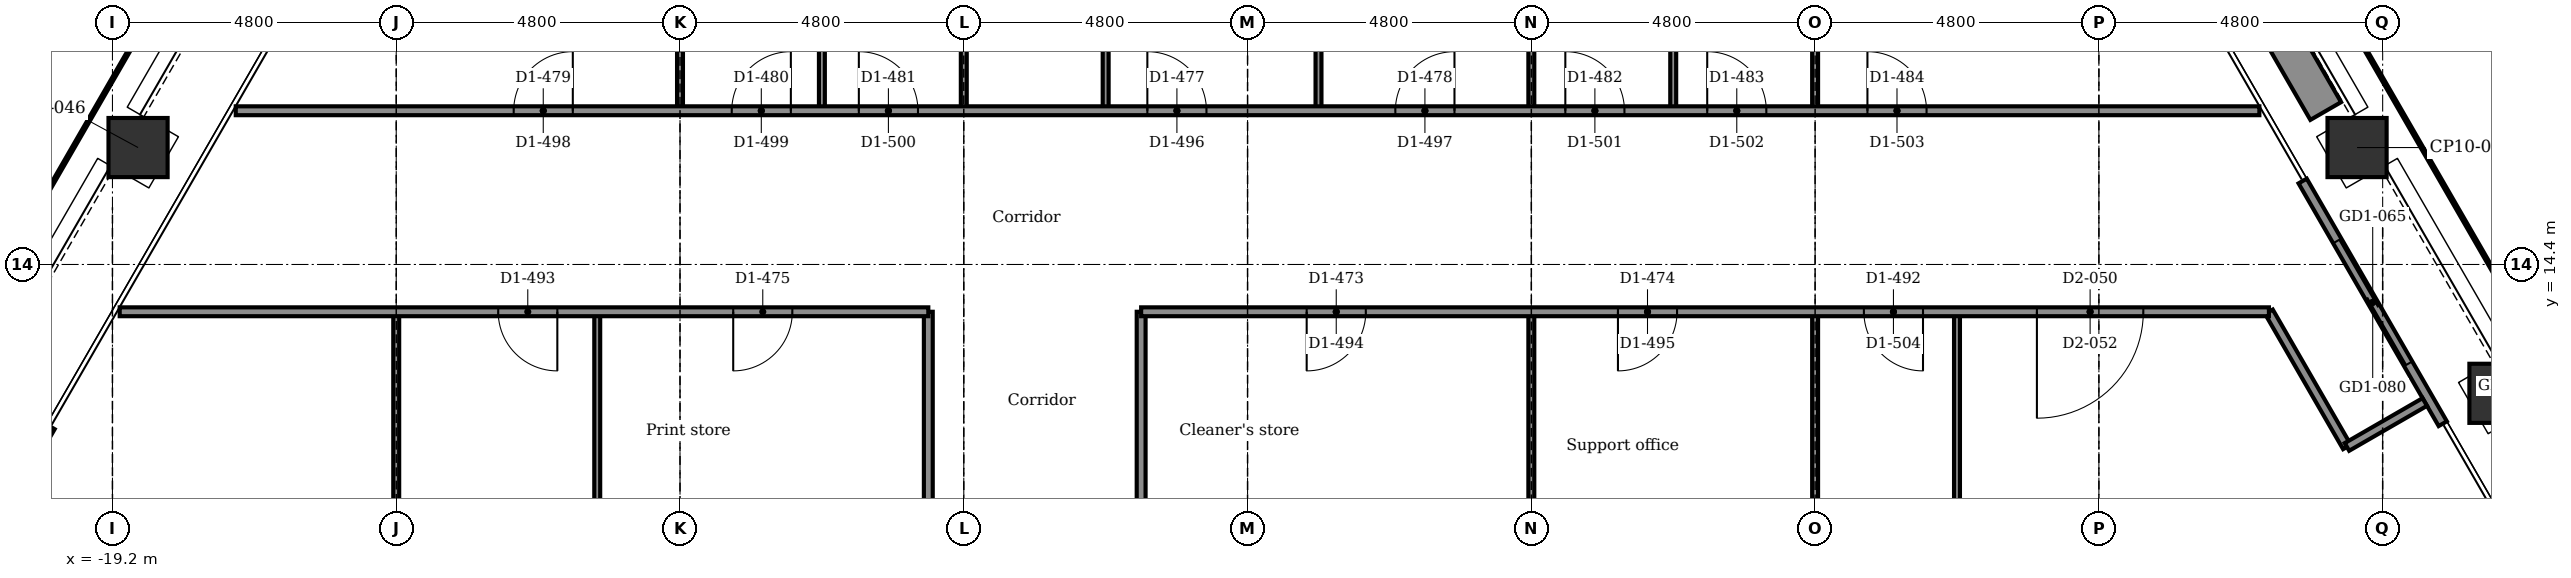
"""IFC4 building model, lengths in metres.
Left out: names, types, materials, properties, quantities, classifications, styles, units other than length and angle.
Written with IfcOpenShell. Run it as: python <this file> out.ifc"""

import sys

from ifc_helpers import new_model, si_unit, direction, frame, frame_2d, origin, origin_2d, place, context, subcontext, project, spatial, rectangle, extrude, element, fill, save


model = new_model("IFC4")
c1 = context("Model", 3, precision=1e-05, world=origin(), true_north=direction((0.0, 1.0)))
c2 = subcontext(c1, "Body", "Model", "MODEL_VIEW")
j1 = project(units=[si_unit("LENGTHUNIT", "METRE"), si_unit("PLANEANGLEUNIT", "RADIAN")], contexts=[c1])
p1 = place(None, origin())
s1 = spatial("IfcSite", under=j1, at=p1, CompositionType="ELEMENT")
p2 = place(p1, origin())
s2 = spatial("IfcBuilding", under=s1, at=p2, CompositionType="ELEMENT")
p3 = place(p2, frame((0.0, 0.0, 170.0)))
s3 = spatial("IfcBuildingStorey", under=s2, at=p3, CompositionType="ELEMENT", Elevation=170.0)
for number, where, z_axis, x_axis in (
    (1, (18.767, 16.378, -0.15), (0.0, 0.0, 1.0), (0.866, 0.5, 0.0)),
    (2, (21.167, 12.221, -0.15), (0.0, 0.0, 1.0), (0.866, 0.5, 0.0)),
    (3, (-18.767, 16.378, -0.15), (0.0, 0.0, 1.0), (0.5, 0.866, 0.0)),
):
    element("IfcColumn", number, at=place(p3, frame(where, z_axis=z_axis, x_axis=x_axis)), inside=s3, PredefinedType="COLUMN", context=c2, shape_type="SweptSolid", body=[
        extrude(rectangle(XDim=1.0, YDim=1.0, at=origin_2d()), origin(), (0.0, 0.0, 1.0), 3.9),
    ])
p4 = place(p3, frame((17.847, 15.812, 0.0), z_axis=(0.0, 0.0, 1.0), x_axis=(0.5000167099, -0.866015756104, 0.0)))
e4 = element("IfcWall", 4, at=p4, inside=s3, PredefinedType="PARTITIONING", context=c2, shape_type="SweptSolid", body=[
    extrude(rectangle(XDim=4.74, YDim=0.16, at=frame_2d((2.37, 0.0))), origin(), (0.0, 0.0, 1.0), 3.75),
])
p5 = place(p4, frame((1.17, 0.0, 0.0)))
e5 = element("IfcOpeningElement", 5, at=p5, cuts=e4, PredefinedType="OPENING", context=c2, shape_type="SweptSolid", body=[
    extrude(rectangle(XDim=2.4, YDim=2.4, at=frame_2d((1.2, 1.2))), frame((0.0, 0.09, 0.0), z_axis=(0.0, -1.0, 0.0), x_axis=(1.0, 0.0, 0.0)), (0.0, 0.0, 1.0), 0.18),
])
p6 = place(p3, frame((-22.617, 7.55, 0.0), z_axis=(0.0, 0.0, 1.0), x_axis=(0.5000167099, 0.866015756104, 0.0)))
e6 = element("IfcWall", 6, at=p6, inside=s3, PredefinedType="PARTITIONING", context=c2, shape_type="SweptSolid", body=[
    extrude(rectangle(XDim=4.74, YDim=0.16, at=frame_2d((2.37, 0.0))), origin(), (0.0, 0.0, 1.0), 3.75),
])
p7 = place(p6, frame((1.17, 0.0, 0.0)))
e7 = element("IfcOpeningElement", 7, at=p7, cuts=e6, PredefinedType="OPENING", context=c2, shape_type="SweptSolid", body=[
    extrude(rectangle(XDim=2.4, YDim=2.4, at=frame_2d((1.2, 1.2))), frame((0.0, 0.09, 0.0), z_axis=(0.0, -1.0, 0.0), x_axis=(1.0, 0.0, 0.0)), (0.0, 0.0, 1.0), 0.18),
])
p8 = place(p3, frame((16.637, 19.767, 0.0), z_axis=(0.0, 0.0, 1.0), x_axis=(0.500028443584, -0.866008981251, 0.0)))
e8 = element("IfcWall", 8, at=p8, inside=s3, PredefinedType="USERDEFINED", context=c2, shape_type="SweptSolid", body=[
    extrude(rectangle(XDim=3.2, YDim=0.6, at=frame_2d((1.6, 0.0))), origin(), (0.0, 0.0, 1.0), 0.7),
])
p9 = place(p3, frame((12.0, -14.042, 0.0), z_axis=(0.0, 0.0, 1.0), x_axis=(0.0, 1.0, 0.0)))
e9 = element("IfcWall", 9, at=p9, inside=s3, PredefinedType="PARTITIONING", context=c2, shape_type="SweptSolid", body=[
    extrude(rectangle(XDim=27.642, YDim=0.1, at=frame_2d((13.821, 0.0))), origin(), (0.0, 0.0, 1.0), 3.75),
])
p10 = place(p3, frame((9.6, 9.95, 0.0), z_axis=(0.0, 0.0, 1.0), x_axis=(0.0, 1.0, 0.0)))
e10 = element("IfcWall", 10, at=p10, inside=s3, PredefinedType="PARTITIONING", context=c2, shape_type="SweptSolid", body=[
    extrude(rectangle(XDim=3.65, YDim=0.1, at=frame_2d((1.825, 0.0))), origin(), (0.0, 0.0, 1.0), 3.066),
])
p11 = place(p3, frame((9.6, 17.0, 0.0), z_axis=(0.0, 0.0, 1.0), x_axis=(0.0, 1.0, 0.0)))
e11 = element("IfcWall", 11, at=p11, inside=s3, PredefinedType="PARTITIONING", context=c2, shape_type="SweptSolid", body=[
    extrude(rectangle(XDim=6.271, YDim=0.1, at=frame_2d((3.136, 0.0))), origin(), (0.0, 0.0, 1.0), 3.066),
])
p12 = place(p3, frame((7.2, 17.0, 0.0), z_axis=(0.0, 0.0, 1.0), x_axis=(0.0, 1.0, 0.0)))
e12 = element("IfcWall", 12, at=p12, inside=s3, PredefinedType="PARTITIONING", context=c2, shape_type="SweptSolid", body=[
    extrude(rectangle(XDim=6.271, YDim=0.1, at=frame_2d((3.136, 0.0))), origin(), (0.0, 0.0, 1.0), 3.75),
])
p13 = place(p3, frame((4.8, 9.95, 0.0), z_axis=(0.0, 0.0, 1.0), x_axis=(0.0, 1.0, 0.0)))
e13 = element("IfcWall", 13, at=p13, inside=s3, PredefinedType="PARTITIONING", context=c2, shape_type="SweptSolid", body=[
    extrude(rectangle(XDim=3.65, YDim=0.1, at=frame_2d((1.825, 0.0))), origin(), (0.0, 0.0, 1.0), 3.066),
])
p14 = place(p3, frame((4.8, 17.0, 0.0), z_axis=(0.0, 0.0, 1.0), x_axis=(0.0, 1.0, 0.0)))
e14 = element("IfcWall", 14, at=p14, inside=s3, PredefinedType="PARTITIONING", context=c2, shape_type="SweptSolid", body=[
    extrude(rectangle(XDim=3.6, YDim=0.1, at=frame_2d((1.8, 0.0))), origin(), (0.0, 0.0, 1.0), 3.066),
])
p15 = place(p3, frame((1.2, 17.0, 0.0), z_axis=(0.0, 0.0, 1.0), x_axis=(0.0, 1.0, 0.0)))
e15 = element("IfcWall", 15, at=p15, inside=s3, PredefinedType="PARTITIONING", context=c2, shape_type="SweptSolid", body=[
    extrude(rectangle(XDim=3.6, YDim=0.1, at=frame_2d((1.8, 0.0))), origin(), (0.0, 0.0, 1.0), 3.75),
])
p16 = place(p3, frame((-1.8, 9.95, 0.0), z_axis=(0.0, 0.0, 1.0), x_axis=(0.0, 1.0, 0.0)))
e16 = element("IfcWall", 16, at=p16, inside=s3, PredefinedType="PARTITIONING", context=c2, shape_type="SweptSolid", body=[
    extrude(rectangle(XDim=3.65, YDim=0.15, at=frame_2d((1.825, 0.0))), origin(), (0.0, 0.0, 1.0), 3.75),
])
p17 = place(p3, frame((-2.4, 17.0, 0.0), z_axis=(0.0, 0.0, 1.0), x_axis=(0.0, 1.0, 0.0)))
e17 = element("IfcWall", 17, at=p17, inside=s3, PredefinedType="PARTITIONING", context=c2, shape_type="SweptSolid", body=[
    extrude(rectangle(XDim=3.6, YDim=0.1, at=frame_2d((1.8, 0.0))), origin(), (0.0, 0.0, 1.0), 3.75),
])
p18 = place(p3, frame((-4.8, 17.0, 0.0), z_axis=(0.0, 0.0, 1.0), x_axis=(0.0, 1.0, 0.0)))
e18 = element("IfcWall", 18, at=p18, inside=s3, PredefinedType="PARTITIONING", context=c2, shape_type="SweptSolid", body=[
    extrude(rectangle(XDim=6.281, YDim=0.1, at=frame_2d((3.141, 0.0))), origin(), (0.0, 0.0, 1.0), 3.066),
])
p19 = place(p3, frame((-5.4, 10.15, 0.0), z_axis=(0.0, 0.0, 1.0), x_axis=(0.0, 1.0, 0.0)))
e19 = element("IfcWall", 19, at=p19, inside=s3, PredefinedType="PARTITIONING", context=c2, shape_type="SweptSolid", body=[
    extrude(rectangle(XDim=3.45, YDim=0.15, at=frame_2d((1.725, 0.0))), origin(), (0.0, 0.0, 1.0), 3.75),
])
p20 = place(p3, frame((-7.2, 17.0, 0.0), z_axis=(0.0, 0.0, 1.0), x_axis=(0.0, 1.0, 0.0)))
e20 = element("IfcWall", 20, at=p20, inside=s3, PredefinedType="PARTITIONING", context=c2, shape_type="SweptSolid", body=[
    extrude(rectangle(XDim=6.271, YDim=0.1, at=frame_2d((3.136, 0.0))), origin(), (0.0, 0.0, 1.0), 3.75),
])
p21 = place(p3, frame((-9.6, 17.0, 0.0), z_axis=(0.0, 0.0, 1.0), x_axis=(0.0, 1.0, 0.0)))
e21 = element("IfcWall", 21, at=p21, inside=s3, PredefinedType="PARTITIONING", context=c2, shape_type="SweptSolid", body=[
    extrude(rectangle(XDim=6.271, YDim=0.1, at=frame_2d((3.136, 0.0))), origin(), (0.0, 0.0, 1.0), 3.066),
])
p22 = place(p3, frame((-11.0, 10.0, 0.0), z_axis=(0.0, 0.0, 1.0), x_axis=(0.0, 1.0, 0.0)))
e22 = element("IfcWall", 22, at=p22, inside=s3, PredefinedType="PARTITIONING", context=c2, shape_type="SweptSolid", body=[
    extrude(rectangle(XDim=3.6, YDim=0.1, at=frame_2d((1.8, 0.0))), origin(), (0.0, 0.0, 1.0), 3.75),
])
p23 = place(p3, frame((-14.4, 9.694, 0.0), z_axis=(0.0, 0.0, 1.0), x_axis=(0.0, 1.0, 0.0)))
e23 = element("IfcWall", 23, at=p23, inside=s3, PredefinedType="PARTITIONING", context=c2, shape_type="SweptSolid", body=[
    extrude(rectangle(XDim=3.906, YDim=0.1, at=frame_2d((1.953, 0.0))), origin(), (0.0, 0.0, 1.0), 3.066),
])
p24 = place(p3, frame((17.276, 13.6, 0.0), z_axis=(0.0, 0.0, 1.0), x_axis=(0.499938597367, -0.866060851709, 0.0)))
e24 = element("IfcWall", 24, at=p24, inside=s3, PredefinedType="PARTITIONING", context=c2, shape_type="SweptSolid", body=[
    extrude(rectangle(XDim=2.64, YDim=0.15, at=frame_2d((1.32, 0.0))), origin(), (0.0, 0.0, 1.0), 3.75),
])
p25 = place(p3, frame((18.596, 11.314, 0.0), z_axis=(0.0, 0.0, 1.0), x_axis=(0.866030456496, 0.499991248344, 0.0)))
e25 = element("IfcWall", 25, at=p25, inside=s3, PredefinedType="PARTITIONING", context=c2, shape_type="SweptSolid", body=[
    extrude(rectangle(XDim=1.52, YDim=0.15, at=frame_2d((0.76, 0.0))), origin(), (0.0, 0.0, 1.0), 3.75),
])
p26 = place(p3, frame((-19.077, 13.6, 0.0), z_axis=(0.0, 0.0, 1.0), x_axis=(1.0, 0.0, 0.0)))
e26 = element("IfcWall", 26, at=p26, inside=s3, PredefinedType="PARTITIONING", context=c2, shape_type="SweptSolid", body=[
    extrude(rectangle(XDim=13.677, YDim=0.15, at=frame_2d((6.839, 0.0))), origin(), (0.0, 0.0, 1.0), 3.75),
])
p27 = place(p26, frame((10.377, 0.0, 0.0)))
e27 = element("IfcOpeningElement", 27, at=p27, cuts=e26, PredefinedType="OPENING", context=c2, shape_type="SweptSolid", body=[
    extrude(rectangle(XDim=1.0, YDim=2.1, at=frame_2d((0.5, 1.05))), frame((0.0, 0.085, 0.0), z_axis=(0.0, -1.0, 0.0), x_axis=(1.0, 0.0, 0.0)), (0.0, 0.0, 1.0), 0.17),
])
p28 = place(p26, frame((6.402, 0.0, 0.0)))
e28 = element("IfcOpeningElement", 28, at=p28, cuts=e26, PredefinedType="OPENING", context=c2, shape_type="SweptSolid", body=[
    extrude(rectangle(XDim=1.0, YDim=2.1, at=frame_2d((0.5, 1.05))), frame((0.0, 0.085, 0.0), z_axis=(0.0, -1.0, 0.0), x_axis=(1.0, 0.0, 0.0)), (0.0, 0.0, 1.0), 0.17),
])
p29 = place(p3, frame((-1.8, 13.6, 0.0), z_axis=(0.0, 0.0, 1.0), x_axis=(1.0, 0.0, 0.0)))
e29 = element("IfcWall", 29, at=p29, inside=s3, PredefinedType="PARTITIONING", context=c2, shape_type="SweptSolid", body=[
    extrude(rectangle(XDim=19.076, YDim=0.15, at=frame_2d((9.538, 0.0))), origin(), (0.0, 0.0, 1.0), 3.75),
])
p30 = place(p29, frame((2.8, 0.0, 0.0)))
e30 = element("IfcOpeningElement", 30, at=p30, cuts=e29, PredefinedType="OPENING", context=c2, shape_type="SweptSolid", body=[
    extrude(rectangle(XDim=1.0, YDim=2.1, at=frame_2d((0.5, 1.05))), frame((0.0, 0.085, 0.0), z_axis=(0.0, -1.0, 0.0), x_axis=(1.0, 0.0, 0.0)), (0.0, 0.0, 1.0), 0.17),
])
p31 = place(p29, frame((8.065, 0.0, 0.0)))
e31 = element("IfcOpeningElement", 31, at=p31, cuts=e29, PredefinedType="OPENING", context=c2, shape_type="SweptSolid", body=[
    extrude(rectangle(XDim=1.0, YDim=2.1, at=frame_2d((0.5, 1.05))), frame((0.0, 0.085, 0.0), z_axis=(0.0, -1.0, 0.0), x_axis=(1.0, 0.0, 0.0)), (0.0, 0.0, 1.0), 0.17),
])
p32 = place(p29, frame((12.225, 0.0, 0.0)))
e32 = element("IfcOpeningElement", 32, at=p32, cuts=e29, PredefinedType="OPENING", context=c2, shape_type="SweptSolid", body=[
    extrude(rectangle(XDim=1.0, YDim=2.1, at=frame_2d((0.5, 1.05))), frame((0.0, 0.085, 0.0), z_axis=(0.0, -1.0, 0.0), x_axis=(1.0, 0.0, 0.0)), (0.0, 0.0, 1.0), 0.17),
])
p33 = place(p29, frame((15.152, 0.0, 0.0)))
e33 = element("IfcOpeningElement", 33, at=p33, cuts=e29, PredefinedType="OPENING", context=c2, shape_type="SweptSolid", body=[
    extrude(rectangle(XDim=1.8, YDim=2.1, at=frame_2d((0.9, 1.05))), frame((0.0, 0.085, 0.0), z_axis=(0.0, -1.0, 0.0), x_axis=(1.0, 0.0, 0.0)), (0.0, 0.0, 1.0), 0.17),
])
p34 = place(p3, frame((-17.115, 17.0, 0.0), z_axis=(0.0, 0.0, 1.0), x_axis=(1.0, 0.0, 0.0)))
e34 = element("IfcWall", 34, at=p34, inside=s3, PredefinedType="PARTITIONING", context=c2, shape_type="SweptSolid", body=[
    extrude(rectangle(XDim=34.229, YDim=0.15, at=frame_2d((17.115, 0.0))), origin(), (0.0, 0.0, 1.0), 3.75),
])
p35 = place(p34, frame((15.419, 0.0, 0.0)))
e35 = element("IfcOpeningElement", 35, at=p35, cuts=e34, PredefinedType="OPENING", context=c2, shape_type="SweptSolid", body=[
    extrude(rectangle(XDim=1.0, YDim=2.1, at=frame_2d((0.5, 1.05))), frame((0.0, 0.085, 0.0), z_axis=(0.0, -1.0, 0.0), x_axis=(1.0, 0.0, 0.0)), (0.0, 0.0, 1.0), 0.17),
])
p36 = place(p34, frame((19.615, 0.0, 0.0)))
e36 = element("IfcOpeningElement", 36, at=p36, cuts=e34, PredefinedType="OPENING", context=c2, shape_type="SweptSolid", body=[
    extrude(rectangle(XDim=1.0, YDim=2.1, at=frame_2d((0.5, 1.05))), frame((0.0, 0.085, 0.0), z_axis=(0.0, -1.0, 0.0), x_axis=(1.0, 0.0, 0.0)), (0.0, 0.0, 1.0), 0.17),
])
p37 = place(p34, frame((4.701, 0.0, 0.0)))
e37 = element("IfcOpeningElement", 37, at=p37, cuts=e34, PredefinedType="OPENING", context=c2, shape_type="SweptSolid", body=[
    extrude(rectangle(XDim=1.0, YDim=2.1, at=frame_2d((0.5, 1.05))), frame((0.0, 0.085, 0.0), z_axis=(0.0, -1.0, 0.0), x_axis=(1.0, 0.0, 0.0)), (0.0, 0.0, 1.0), 0.17),
])
p38 = place(p34, frame((8.389, 0.0, 0.0)))
e38 = element("IfcOpeningElement", 38, at=p38, cuts=e34, PredefinedType="OPENING", context=c2, shape_type="SweptSolid", body=[
    extrude(rectangle(XDim=1.0, YDim=2.1, at=frame_2d((0.5, 1.05))), frame((0.0, 0.085, 0.0), z_axis=(0.0, -1.0, 0.0), x_axis=(1.0, 0.0, 0.0)), (0.0, 0.0, 1.0), 0.17),
])
p39 = place(p34, frame((10.539, 0.0, 0.0)))
e39 = element("IfcOpeningElement", 39, at=p39, cuts=e34, PredefinedType="OPENING", context=c2, shape_type="SweptSolid", body=[
    extrude(rectangle(XDim=1.0, YDim=2.1, at=frame_2d((0.5, 1.05))), frame((0.0, 0.085, 0.0), z_axis=(0.0, -1.0, 0.0), x_axis=(1.0, 0.0, 0.0)), (0.0, 0.0, 1.0), 0.17),
])
p40 = place(p34, frame((22.49, 0.0, 0.0)))
e40 = element("IfcOpeningElement", 40, at=p40, cuts=e34, PredefinedType="OPENING", context=c2, shape_type="SweptSolid", body=[
    extrude(rectangle(XDim=1.0, YDim=2.1, at=frame_2d((0.5, 1.05))), frame((0.0, 0.085, 0.0), z_axis=(0.0, -1.0, 0.0), x_axis=(1.0, 0.0, 0.0)), (0.0, 0.0, 1.0), 0.17),
])
p41 = place(p34, frame((24.889, 0.0, 0.0)))
e41 = element("IfcOpeningElement", 41, at=p41, cuts=e34, PredefinedType="OPENING", context=c2, shape_type="SweptSolid", body=[
    extrude(rectangle(XDim=1.0, YDim=2.1, at=frame_2d((0.5, 1.05))), frame((0.0, 0.085, 0.0), z_axis=(0.0, -1.0, 0.0), x_axis=(1.0, 0.0, 0.0)), (0.0, 0.0, 1.0), 0.17),
])
p42 = place(p34, frame((27.599, 0.0, 0.0)))
e42 = element("IfcOpeningElement", 42, at=p42, cuts=e34, PredefinedType="OPENING", context=c2, shape_type="SweptSolid", body=[
    extrude(rectangle(XDim=1.0, YDim=2.1, at=frame_2d((0.5, 1.05))), frame((0.0, 0.085, 0.0), z_axis=(0.0, -1.0, 0.0), x_axis=(1.0, 0.0, 0.0)), (0.0, 0.0, 1.0), 0.17),
])
p43 = place(p5, origin())
e43 = element("IfcDoor", 43, at=p43, inside=s3, OperationType="DOUBLE_DOOR_SLIDING", PredefinedType="DOOR", context=c2, shape_type="SweptSolid", body=[
    extrude(rectangle(XDim=2.4, YDim=2.4, at=frame_2d((1.2, 1.2))), frame((0.0, 0.025, 0.0), z_axis=(0.0, -1.0, 0.0), x_axis=(1.0, 0.0, 0.0)), (0.0, 0.0, 1.0), 0.05),
])
fill(e5, e43)
p44 = place(p30, frame((1.0, 0.0, 0.0), z_axis=(0.0, 0.0, 1.0), x_axis=(-1.0, 0.0, 0.0)))
e44 = element("IfcDoor", 44, at=p44, inside=s3, OperationType="SINGLE_SWING_LEFT", PredefinedType="DOOR", context=c2, shape_type="SweptSolid", body=[
    extrude(rectangle(XDim=1.0, YDim=2.1, at=frame_2d((0.5, 1.05))), frame((0.0, 0.025, 0.0), z_axis=(0.0, -1.0, 0.0), x_axis=(1.0, 0.0, 0.0)), (0.0, 0.0, 1.0), 0.05),
])
fill(e30, e44)
p45 = place(p31, frame((1.0, 0.0, 0.0), z_axis=(0.0, 0.0, 1.0), x_axis=(-1.0, 0.0, 0.0)))
e45 = element("IfcDoor", 45, at=p45, inside=s3, OperationType="SINGLE_SWING_LEFT", PredefinedType="DOOR", context=c2, shape_type="SweptSolid", body=[
    extrude(rectangle(XDim=1.0, YDim=2.1, at=frame_2d((0.5, 1.05))), frame((0.0, 0.025, 0.0), z_axis=(0.0, -1.0, 0.0), x_axis=(1.0, 0.0, 0.0)), (0.0, 0.0, 1.0), 0.05),
])
fill(e31, e45)
p46 = place(p27, frame((1.0, 0.0, 0.0), z_axis=(0.0, 0.0, 1.0), x_axis=(-1.0, 0.0, 0.0)))
e46 = element("IfcDoor", 46, at=p46, inside=s3, OperationType="SINGLE_SWING_LEFT", PredefinedType="DOOR", context=c2, shape_type="SweptSolid", body=[
    extrude(rectangle(XDim=1.0, YDim=2.1, at=frame_2d((0.5, 1.05))), frame((0.0, 0.025, 0.0), z_axis=(0.0, -1.0, 0.0), x_axis=(1.0, 0.0, 0.0)), (0.0, 0.0, 1.0), 0.05),
])
fill(e27, e46)
p47 = place(p35, origin())
e47 = element("IfcDoor", 47, at=p47, inside=s3, OperationType="SINGLE_SWING_LEFT", PredefinedType="DOOR", context=c2, shape_type="SweptSolid", body=[
    extrude(rectangle(XDim=1.0, YDim=2.1, at=frame_2d((0.5, 1.05))), frame((0.0, 0.025, 0.0), z_axis=(0.0, -1.0, 0.0), x_axis=(1.0, 0.0, 0.0)), (0.0, 0.0, 1.0), 0.05),
])
fill(e35, e47)
p48 = place(p36, origin())
e48 = element("IfcDoor", 48, at=p48, inside=s3, OperationType="SINGLE_SWING_RIGHT", PredefinedType="DOOR", context=c2, shape_type="SweptSolid", body=[
    extrude(rectangle(XDim=1.0, YDim=2.1, at=frame_2d((0.5, 1.05))), frame((0.0, 0.025, 0.0), z_axis=(0.0, -1.0, 0.0), x_axis=(1.0, 0.0, 0.0)), (0.0, 0.0, 1.0), 0.05),
])
fill(e36, e48)
p49 = place(p37, origin())
e49 = element("IfcDoor", 49, at=p49, inside=s3, OperationType="SINGLE_SWING_RIGHT", PredefinedType="DOOR", context=c2, shape_type="SweptSolid", body=[
    extrude(rectangle(XDim=1.0, YDim=2.1, at=frame_2d((0.5, 1.05))), frame((0.0, 0.025, 0.0), z_axis=(0.0, -1.0, 0.0), x_axis=(1.0, 0.0, 0.0)), (0.0, 0.0, 1.0), 0.05),
])
fill(e37, e49)
p50 = place(p38, origin())
e50 = element("IfcDoor", 50, at=p50, inside=s3, OperationType="SINGLE_SWING_RIGHT", PredefinedType="DOOR", context=c2, shape_type="SweptSolid", body=[
    extrude(rectangle(XDim=1.0, YDim=2.1, at=frame_2d((0.5, 1.05))), frame((0.0, 0.025, 0.0), z_axis=(0.0, -1.0, 0.0), x_axis=(1.0, 0.0, 0.0)), (0.0, 0.0, 1.0), 0.05),
])
fill(e38, e50)
p51 = place(p39, origin())
e51 = element("IfcDoor", 51, at=p51, inside=s3, OperationType="SINGLE_SWING_LEFT", PredefinedType="DOOR", context=c2, shape_type="SweptSolid", body=[
    extrude(rectangle(XDim=1.0, YDim=2.1, at=frame_2d((0.5, 1.05))), frame((0.0, 0.025, 0.0), z_axis=(0.0, -1.0, 0.0), x_axis=(1.0, 0.0, 0.0)), (0.0, 0.0, 1.0), 0.05),
])
fill(e39, e51)
p52 = place(p40, origin())
e52 = element("IfcDoor", 52, at=p52, inside=s3, OperationType="SINGLE_SWING_LEFT", PredefinedType="DOOR", context=c2, shape_type="SweptSolid", body=[
    extrude(rectangle(XDim=1.0, YDim=2.1, at=frame_2d((0.5, 1.05))), frame((0.0, 0.025, 0.0), z_axis=(0.0, -1.0, 0.0), x_axis=(1.0, 0.0, 0.0)), (0.0, 0.0, 1.0), 0.05),
])
fill(e40, e52)
p53 = place(p41, origin())
e53 = element("IfcDoor", 53, at=p53, inside=s3, OperationType="SINGLE_SWING_LEFT", PredefinedType="DOOR", context=c2, shape_type="SweptSolid", body=[
    extrude(rectangle(XDim=1.0, YDim=2.1, at=frame_2d((0.5, 1.05))), frame((0.0, 0.025, 0.0), z_axis=(0.0, -1.0, 0.0), x_axis=(1.0, 0.0, 0.0)), (0.0, 0.0, 1.0), 0.05),
])
fill(e41, e53)
p54 = place(p42, origin())
e54 = element("IfcDoor", 54, at=p54, inside=s3, OperationType="SINGLE_SWING_LEFT", PredefinedType="DOOR", context=c2, shape_type="SweptSolid", body=[
    extrude(rectangle(XDim=1.0, YDim=2.1, at=frame_2d((0.5, 1.05))), frame((0.0, 0.025, 0.0), z_axis=(0.0, -1.0, 0.0), x_axis=(1.0, 0.0, 0.0)), (0.0, 0.0, 1.0), 0.05),
])
fill(e42, e54)
p55 = place(p32, frame((1.0, 0.0, 0.0), z_axis=(0.0, 0.0, 1.0), x_axis=(-1.0, 0.0, 0.0)))
e55 = element("IfcDoor", 55, at=p55, inside=s3, OperationType="SINGLE_SWING_RIGHT", PredefinedType="DOOR", context=c2, shape_type="SweptSolid", body=[
    extrude(rectangle(XDim=1.0, YDim=2.1, at=frame_2d((0.5, 1.05))), frame((0.0, 0.025, 0.0), z_axis=(0.0, -1.0, 0.0), x_axis=(1.0, 0.0, 0.0)), (0.0, 0.0, 1.0), 0.05),
])
fill(e32, e55)
p56 = place(p33, frame((1.8, 0.0, 0.0), z_axis=(0.0, 0.0, 1.0), x_axis=(-1.0, 0.0, 0.0)))
e56 = element("IfcDoor", 56, at=p56, inside=s3, OperationType="SINGLE_SWING_LEFT", PredefinedType="DOOR", context=c2, shape_type="SweptSolid", body=[
    extrude(rectangle(XDim=1.8, YDim=2.1, at=frame_2d((0.9, 1.05))), frame((0.0, 0.025, 0.0), z_axis=(0.0, -1.0, 0.0), x_axis=(1.0, 0.0, 0.0)), (0.0, 0.0, 1.0), 0.05),
])
fill(e33, e56)
p57 = place(p28, frame((1.0, 0.0, 0.0), z_axis=(0.0, 0.0, 1.0), x_axis=(-1.0, 0.0, 0.0)))
e57 = element("IfcDoor", 57, at=p57, inside=s3, OperationType="SINGLE_SWING_RIGHT", PredefinedType="DOOR", context=c2, shape_type="SweptSolid", body=[
    extrude(rectangle(XDim=1.0, YDim=2.1, at=frame_2d((0.5, 1.05))), frame((0.0, 0.025, 0.0), z_axis=(0.0, -1.0, 0.0), x_axis=(1.0, 0.0, 0.0)), (0.0, 0.0, 1.0), 0.05),
])
fill(e28, e57)
save(model, sys.argv[1])
